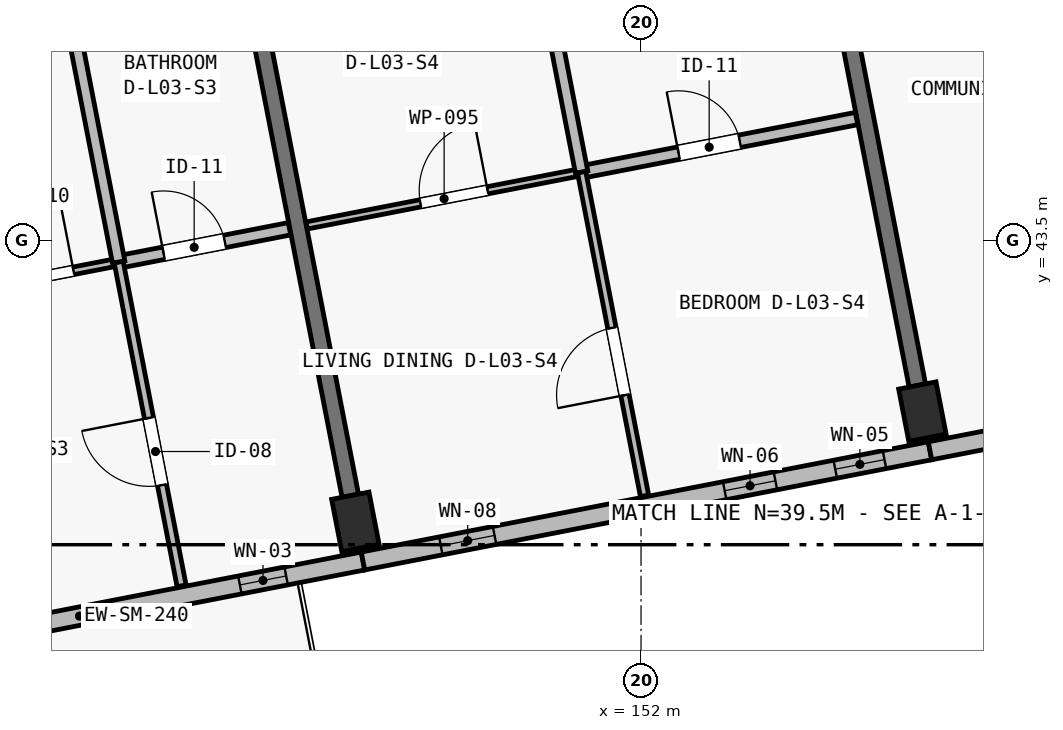
"""IFC4 building model, lengths in metres.
Left out: names, types, materials, properties, quantities, classifications, styles, units other than length and angle.
Written with IfcOpenShell. Run it as: python <this file> out.ifc"""

import sys

from ifc_helpers import new_model, si_unit, direction, frame, frame_2d, origin, origin_2d, place, context, subcontext, project, spatial, rectangle, extrude, element, fill, save


model = new_model("IFC4")
c1 = context("Model", 3, precision=1e-05, world=origin(), true_north=direction((0.0, 1.0)))
c2 = subcontext(c1, "Body", "Model", "MODEL_VIEW")
j1 = project(units=[si_unit("LENGTHUNIT", "METRE"), si_unit("PLANEANGLEUNIT", "RADIAN")], contexts=[c1])
p1 = place(None, origin())
s1 = spatial("IfcSite", under=j1, at=p1, CompositionType="ELEMENT")
p2 = place(p1, origin())
s2 = spatial("IfcBuilding", under=s1, at=p2, CompositionType="ELEMENT")
p3 = place(p2, frame((0.0, 0.0, 11.65)))
s3 = spatial("IfcBuildingStorey", under=s2, at=p3, CompositionType="ELEMENT", Elevation=11.65)
for number, where, z_axis, x_axis in (
    (1, (148.241, 39.801, 0.0), (0.0, 0.0, 1.0), (0.982, 0.191, 0.0)),
    (2, (155.702, 41.251, 0.0), (0.0, 0.0, 1.0), (0.982, 0.191, 0.0)),
):
    element("IfcColumn", number, at=place(p3, frame(where, z_axis=z_axis, x_axis=x_axis)), inside=s3, PredefinedType="COLUMN", context=c2, shape_type="SweptSolid", body=[
        extrude(rectangle(XDim=0.5, YDim=0.7, at=origin_2d()), origin(), (0.0, 0.0, 1.0), 3.25),
    ])
p4 = place(p3, frame((148.175, 40.144, 0.0), z_axis=(0.0, 0.0, 1.0), x_axis=(-0.190812837813, 0.981626436546, 0.0)))
e3 = element("IfcWall", 3, at=p4, inside=s3, PredefinedType="SHEAR", context=c2, shape_type="SweptSolid", body=[
    extrude(rectangle(XDim=6.9, YDim=0.22, at=frame_2d((3.45, 0.0))), origin(), (0.0, 0.0, 1.0), 2.5),
])
p5 = place(p3, frame((155.635, 41.594, 0.0), z_axis=(0.0, 0.0, 1.0), x_axis=(-0.190819465253, 0.981625148252, 0.0)))
e4 = element("IfcWall", 4, at=p5, inside=s3, PredefinedType="SHEAR", context=c2, shape_type="SweptSolid", body=[
    extrude(rectangle(XDim=6.9, YDim=0.22, at=frame_2d((3.45, 0.0))), origin(), (0.0, 0.0, 1.0), 2.5),
])
p6 = place(p3, frame((148.342, 39.285, 0.0), z_axis=(0.0, 0.0, 1.0), x_axis=(-0.981631269434, -0.190787973596, 0.0)))
e5 = element("IfcWall", 5, at=p6, inside=s3, PredefinedType="SOLIDWALL", context=c2, shape_type="SweptSolid", body=[
    extrude(rectangle(XDim=7.6, YDim=0.24, at=frame_2d((3.8, 0.0))), origin(), (0.0, 0.0, 1.0), 3.0),
])
p7 = place(p6, frame((5.019, 0.0, 0.0)))
e6 = element("IfcOpeningElement", 6, at=p7, cuts=e5, PredefinedType="OPENING", context=c2, shape_type="SweptSolid", body=[
    extrude(rectangle(XDim=1.8, YDim=2.12, at=frame_2d((0.9, 1.06))), frame((0.0, 0.135, 0.0), z_axis=(0.0, -1.0, 0.0), x_axis=(1.0, 0.0, 0.0)), (0.0, 0.0, 1.0), 0.27),
])
p8 = place(p6, frame((1.03, 0.0, 0.42)))
e7 = element("IfcOpeningElement", 7, at=p8, cuts=e5, PredefinedType="OPENING", context=c2, shape_type="SweptSolid", body=[
    extrude(rectangle(XDim=0.62, YDim=2.28, at=frame_2d((0.31, 1.14))), frame((0.0, 0.135, 0.0), z_axis=(0.0, -1.0, 0.0), x_axis=(1.0, 0.0, 0.0)), (0.0, 0.0, 1.0), 0.27),
])
p9 = place(p3, frame((155.802, 40.735, 0.0), z_axis=(0.0, 0.0, 1.0), x_axis=(-0.981626422232, -0.190812911449, 0.0)))
e8 = element("IfcWall", 8, at=p9, inside=s3, PredefinedType="SOLIDWALL", context=c2, shape_type="SweptSolid", body=[
    extrude(rectangle(XDim=7.6, YDim=0.24, at=frame_2d((3.8, 0.0))), origin(), (0.0, 0.0, 1.0), 3.0),
])
p10 = place(p9, frame((0.61, 0.0, 0.48)))
e9 = element("IfcOpeningElement", 9, at=p10, cuts=e8, PredefinedType="OPENING", context=c2, shape_type="SweptSolid", body=[
    extrude(rectangle(XDim=0.66, YDim=2.32, at=frame_2d((0.33, 1.16))), frame((0.0, 0.135, 0.0), z_axis=(0.0, -1.0, 0.0), x_axis=(1.0, 0.0, 0.0)), (0.0, 0.0, 1.0), 0.27),
])
p11 = place(p9, frame((2.072, 0.0, 0.52)))
e10 = element("IfcOpeningElement", 10, at=p11, cuts=e8, PredefinedType="OPENING", context=c2, shape_type="SweptSolid", body=[
    extrude(rectangle(XDim=0.68, YDim=2.24, at=frame_2d((0.34, 1.12))), frame((0.0, 0.135, 0.0), z_axis=(0.0, -1.0, 0.0), x_axis=(1.0, 0.0, 0.0)), (0.0, 0.0, 1.0), 0.27),
])
p12 = place(p9, frame((5.837, 0.0, 0.48)))
e11 = element("IfcOpeningElement", 11, at=p12, cuts=e8, PredefinedType="OPENING", context=c2, shape_type="SweptSolid", body=[
    extrude(rectangle(XDim=0.72, YDim=2.16, at=frame_2d((0.36, 1.08))), frame((0.0, 0.135, 0.0), z_axis=(0.0, -1.0, 0.0), x_axis=(1.0, 0.0, 0.0)), (0.0, 0.0, 1.0), 0.27),
])
p13 = place(p3, frame((163.778, 42.286, 0.0), z_axis=(0.0, 0.0, 1.0), x_axis=(-0.981628367112, -0.190802905848, 0.0)))
e12 = element("IfcWall", 12, at=p13, inside=s3, PredefinedType="SOLIDWALL", context=c2, shape_type="SweptSolid", body=[
    extrude(rectangle(XDim=8.125, YDim=0.24, at=frame_2d((4.062, 0.0))), origin(), (0.0, 0.0, 1.0), 3.0),
])
p14 = place(p13, frame((1.646, 0.0, 0.52)))
e13 = element("IfcOpeningElement", 13, at=p14, cuts=e12, PredefinedType="OPENING", context=c2, shape_type="SweptSolid", body=[
    extrude(rectangle(XDim=0.76, YDim=2.34, at=frame_2d((0.38, 1.17))), frame((0.0, 0.135, 0.0), z_axis=(0.0, -1.0, 0.0), x_axis=(1.0, 0.0, 0.0)), (0.0, 0.0, 1.0), 0.27),
])
p15 = place(p13, frame((6.219, 0.0, 0.52)))
e14 = element("IfcOpeningElement", 14, at=p15, cuts=e12, PredefinedType="OPENING", context=c2, shape_type="SweptSolid", body=[
    extrude(rectangle(XDim=0.82, YDim=2.18, at=frame_2d((0.41, 1.09))), frame((0.0, 0.135, 0.0), z_axis=(0.0, -1.0, 0.0), x_axis=(1.0, 0.0, 0.0)), (0.0, 0.0, 1.0), 0.27),
])
p16 = place(p3, frame((140.14, 42.25, 0.0), z_axis=(0.0, 0.0, 1.0), x_axis=(0.98162014174, 0.190845218255, 0.0)))
e15 = element("IfcWall", 15, at=p16, inside=s3, PredefinedType="PARTITIONING", context=c2, shape_type="SweptSolid", body=[
    extrude(rectangle(XDim=5.08, YDim=0.1, at=frame_2d((2.54, 0.0))), origin(), (0.0, 0.0, 1.0), 2.97),
])
p17 = place(p16, frame((3.595, 0.0, 0.0)))
e16 = element("IfcOpeningElement", 16, at=p17, cuts=e15, PredefinedType="OPENING", context=c2, shape_type="SweptSolid", body=[
    extrude(rectangle(XDim=0.88, YDim=2.1, at=frame_2d((0.44, 1.05))), frame((0.0, 0.065, 0.0), z_axis=(0.0, -1.0, 0.0), x_axis=(1.0, 0.0, 0.0)), (0.0, 0.0, 1.0), 0.13),
])
p18 = place(p3, frame((145.127, 43.219, 0.0), z_axis=(0.0, 0.0, 1.0), x_axis=(0.981644229922, 0.190721277946, 0.0)))
e17 = element("IfcWall", 17, at=p18, inside=s3, PredefinedType="PLUMBINGWALL", context=c2, shape_type="SweptSolid", body=[
    extrude(rectangle(XDim=2.29, YDim=0.165, at=frame_2d((1.145, 0.0))), origin(), (0.0, 0.0, 1.0), 2.97),
])
p19 = place(p18, frame((0.602, 0.0, 0.0)))
e18 = element("IfcOpeningElement", 18, at=p19, cuts=e17, PredefinedType="OPENING", context=c2, shape_type="SweptSolid", body=[
    extrude(rectangle(XDim=0.82, YDim=2.08, at=frame_2d((0.41, 1.04))), frame((0.0, 0.097, 0.0), z_axis=(0.0, -1.0, 0.0), x_axis=(1.0, 0.0, 0.0)), (0.0, 0.0, 1.0), 0.195),
])
p20 = place(p3, frame((145.955, 38.959, 0.0), z_axis=(0.0, 0.0, 1.0), x_axis=(-0.190812443151, 0.981626513262, 0.0)))
e19 = element("IfcWall", 19, at=p20, inside=s3, PredefinedType="PARTITIONING", context=c2, shape_type="SweptSolid", body=[
    extrude(rectangle(XDim=4.34, YDim=0.12, at=frame_2d((2.17, 0.0))), origin(), (0.0, 0.0, 1.0), 2.97),
])
p21 = place(p20, frame((1.35, 0.0, 0.0)))
e20 = element("IfcOpeningElement", 20, at=p21, cuts=e19, PredefinedType="OPENING", context=c2, shape_type="SweptSolid", body=[
    extrude(rectangle(XDim=0.9, YDim=2.1, at=frame_2d((0.45, 1.05))), frame((0.0, 0.075, 0.0), z_axis=(0.0, -1.0, 0.0), x_axis=(1.0, 0.0, 0.0)), (0.0, 0.0, 1.0), 0.15),
])
p22 = place(p3, frame((145.127, 43.219, 0.0), z_axis=(0.0, 0.0, 1.0), x_axis=(-0.19081827974, 0.981625378705, 0.0)))
e21 = element("IfcWall", 21, at=p22, inside=s3, PredefinedType="PLUMBINGWALL", context=c2, shape_type="SweptSolid", body=[
    extrude(rectangle(XDim=4.07, YDim=0.165, at=frame_2d((2.035, 0.0))), origin(), (0.0, 0.0, 1.0), 2.97),
])
p23 = place(p3, frame((147.601, 43.7, 0.0), z_axis=(0.0, 0.0, 1.0), x_axis=(0.981628834294, 0.190800502313, 0.0)))
e22 = element("IfcWall", 22, at=p23, inside=s3, PredefinedType="PARTITIONING", context=c2, shape_type="SweptSolid", body=[
    extrude(rectangle(XDim=3.685, YDim=0.095, at=frame_2d((1.843, 0.0))), origin(), (0.0, 0.0, 1.0), 2.97),
])
p24 = place(p23, frame((1.525, 0.0, 0.0)))
e23 = element("IfcOpeningElement", 23, at=p24, cuts=e22, PredefinedType="OPENING", context=c2, shape_type="SweptSolid", body=[
    extrude(rectangle(XDim=0.9, YDim=2.1, at=frame_2d((0.45, 1.05))), frame((0.0, 0.062, 0.0), z_axis=(0.0, -1.0, 0.0), x_axis=(1.0, 0.0, 0.0)), (0.0, 0.0, 1.0), 0.125),
])
p25 = place(p3, frame((151.218, 44.403, 0.0), z_axis=(0.0, 0.0, 1.0), x_axis=(0.981626422232, 0.190812911449, 0.0)))
e24 = element("IfcWall", 24, at=p25, inside=s3, PredefinedType="PLUMBINGWALL", context=c2, shape_type="SweptSolid", body=[
    extrude(rectangle(XDim=3.685, YDim=0.165, at=frame_2d((1.842, 0.0))), origin(), (0.0, 0.0, 1.0), 2.97),
])
p26 = place(p25, frame((1.3, 0.0, 0.0)))
e25 = element("IfcOpeningElement", 25, at=p26, cuts=e24, PredefinedType="OPENING", context=c2, shape_type="SweptSolid", body=[
    extrude(rectangle(XDim=0.82, YDim=2.08, at=frame_2d((0.41, 1.04))), frame((0.0, 0.097, 0.0), z_axis=(0.0, -1.0, 0.0), x_axis=(1.0, 0.0, 0.0)), (0.0, 0.0, 1.0), 0.195),
])
p27 = place(p3, frame((152.046, 40.143, 0.0), z_axis=(0.0, 0.0, 1.0), x_axis=(-0.190812443151, 0.981626513262, 0.0)))
e26 = element("IfcWall", 26, at=p27, inside=s3, PredefinedType="PARTITIONING", context=c2, shape_type="SweptSolid", body=[
    extrude(rectangle(XDim=4.34, YDim=0.11, at=frame_2d((2.17, 0.0))), origin(), (0.0, 0.0, 1.0), 2.97),
])
p28 = place(p27, frame((1.35, 0.0, 0.0)))
e27 = element("IfcOpeningElement", 27, at=p28, cuts=e26, PredefinedType="OPENING", context=c2, shape_type="SweptSolid", body=[
    extrude(rectangle(XDim=0.9, YDim=2.1, at=frame_2d((0.45, 1.05))), frame((0.0, 0.07, 0.0), z_axis=(0.0, -1.0, 0.0), x_axis=(1.0, 0.0, 0.0)), (0.0, 0.0, 1.0), 0.14),
])
p29 = place(p3, frame((151.218, 44.403, 0.0), z_axis=(0.0, 0.0, 1.0), x_axis=(-0.190807044121, 0.981627562731, 0.0)))
e28 = element("IfcWall", 28, at=p29, inside=s3, PredefinedType="PLUMBINGWALL", context=c2, shape_type="SweptSolid", body=[
    extrude(rectangle(XDim=4.07, YDim=0.165, at=frame_2d((2.035, 0.0))), origin(), (0.0, 0.0, 1.0), 2.97),
])
p30 = place(p8, origin())
e29 = element("IfcWindow", 29, at=p30, inside=s3, PartitioningType="SINGLE_PANEL", PredefinedType="WINDOW", context=c2, shape_type="SweptSolid", body=[
    extrude(rectangle(XDim=0.62, YDim=2.28, at=frame_2d((0.31, 1.14))), frame((0.0, 0.03, 0.0), z_axis=(0.0, -1.0, 0.0), x_axis=(1.0, 0.0, 0.0)), (0.0, 0.0, 1.0), 0.06),
])
fill(e7, e29)
p31 = place(p10, origin())
e30 = element("IfcWindow", 30, at=p31, inside=s3, PartitioningType="SINGLE_PANEL", PredefinedType="WINDOW", context=c2, shape_type="SweptSolid", body=[
    extrude(rectangle(XDim=0.66, YDim=2.32, at=frame_2d((0.33, 1.16))), frame((0.0, 0.03, 0.0), z_axis=(0.0, -1.0, 0.0), x_axis=(1.0, 0.0, 0.0)), (0.0, 0.0, 1.0), 0.06),
])
fill(e9, e30)
p32 = place(p11, origin())
e31 = element("IfcWindow", 31, at=p32, inside=s3, PartitioningType="SINGLE_PANEL", PredefinedType="WINDOW", context=c2, shape_type="SweptSolid", body=[
    extrude(rectangle(XDim=0.68, YDim=2.24, at=frame_2d((0.34, 1.12))), frame((0.0, 0.03, 0.0), z_axis=(0.0, -1.0, 0.0), x_axis=(1.0, 0.0, 0.0)), (0.0, 0.0, 1.0), 0.06),
])
fill(e10, e31)
p33 = place(p12, origin())
e32 = element("IfcWindow", 32, at=p33, inside=s3, PartitioningType="SINGLE_PANEL", PredefinedType="WINDOW", context=c2, shape_type="SweptSolid", body=[
    extrude(rectangle(XDim=0.72, YDim=2.16, at=frame_2d((0.36, 1.08))), frame((0.0, 0.03, 0.0), z_axis=(0.0, -1.0, 0.0), x_axis=(1.0, 0.0, 0.0)), (0.0, 0.0, 1.0), 0.06),
])
fill(e11, e32)
p34 = place(p17, origin())
e33 = element("IfcDoor", 33, at=p34, inside=s3, OperationType="SINGLE_SWING_RIGHT", PredefinedType="DOOR", context=c2, shape_type="SweptSolid", body=[
    extrude(rectangle(XDim=0.88, YDim=2.1, at=frame_2d((0.44, 1.05))), frame((0.0, 0.025, 0.0), z_axis=(0.0, -1.0, 0.0), x_axis=(1.0, 0.0, 0.0)), (0.0, 0.0, 1.0), 0.05),
])
fill(e16, e33)
p35 = place(p19, origin())
e34 = element("IfcDoor", 34, at=p35, inside=s3, OperationType="SINGLE_SWING_LEFT", PredefinedType="DOOR", context=c2, shape_type="SweptSolid", body=[
    extrude(rectangle(XDim=0.82, YDim=2.08, at=frame_2d((0.41, 1.04))), frame((0.0, 0.025, 0.0), z_axis=(0.0, -1.0, 0.0), x_axis=(1.0, 0.0, 0.0)), (0.0, 0.0, 1.0), 0.05),
])
fill(e18, e34)
p36 = place(p21, origin())
e35 = element("IfcDoor", 35, at=p36, inside=s3, OperationType="SINGLE_SWING_RIGHT", PredefinedType="DOOR", context=c2, shape_type="SweptSolid", body=[
    extrude(rectangle(XDim=0.9, YDim=2.1, at=frame_2d((0.45, 1.05))), frame((0.0, 0.025, 0.0), z_axis=(0.0, -1.0, 0.0), x_axis=(1.0, 0.0, 0.0)), (0.0, 0.0, 1.0), 0.05),
])
fill(e20, e35)
p37 = place(p24, origin())
e36 = element("IfcDoor", 36, at=p37, inside=s3, OperationType="SINGLE_SWING_RIGHT", PredefinedType="DOOR", context=c2, shape_type="SweptSolid", body=[
    extrude(rectangle(XDim=0.9, YDim=2.1, at=frame_2d((0.45, 1.05))), frame((0.0, 0.025, 0.0), z_axis=(0.0, -1.0, 0.0), x_axis=(1.0, 0.0, 0.0)), (0.0, 0.0, 1.0), 0.05),
])
fill(e23, e36)
p38 = place(p26, origin())
e37 = element("IfcDoor", 37, at=p38, inside=s3, OperationType="SINGLE_SWING_LEFT", PredefinedType="DOOR", context=c2, shape_type="SweptSolid", body=[
    extrude(rectangle(XDim=0.82, YDim=2.08, at=frame_2d((0.41, 1.04))), frame((0.0, 0.025, 0.0), z_axis=(0.0, -1.0, 0.0), x_axis=(1.0, 0.0, 0.0)), (0.0, 0.0, 1.0), 0.05),
])
fill(e25, e37)
p39 = place(p28, origin())
e38 = element("IfcDoor", 38, at=p39, inside=s3, OperationType="SINGLE_SWING_LEFT", PredefinedType="DOOR", context=c2, shape_type="SweptSolid", body=[
    extrude(rectangle(XDim=0.9, YDim=2.1, at=frame_2d((0.45, 1.05))), frame((0.0, 0.025, 0.0), z_axis=(0.0, -1.0, 0.0), x_axis=(1.0, 0.0, 0.0)), (0.0, 0.0, 1.0), 0.05),
])
fill(e27, e38)
save(model, sys.argv[1])
